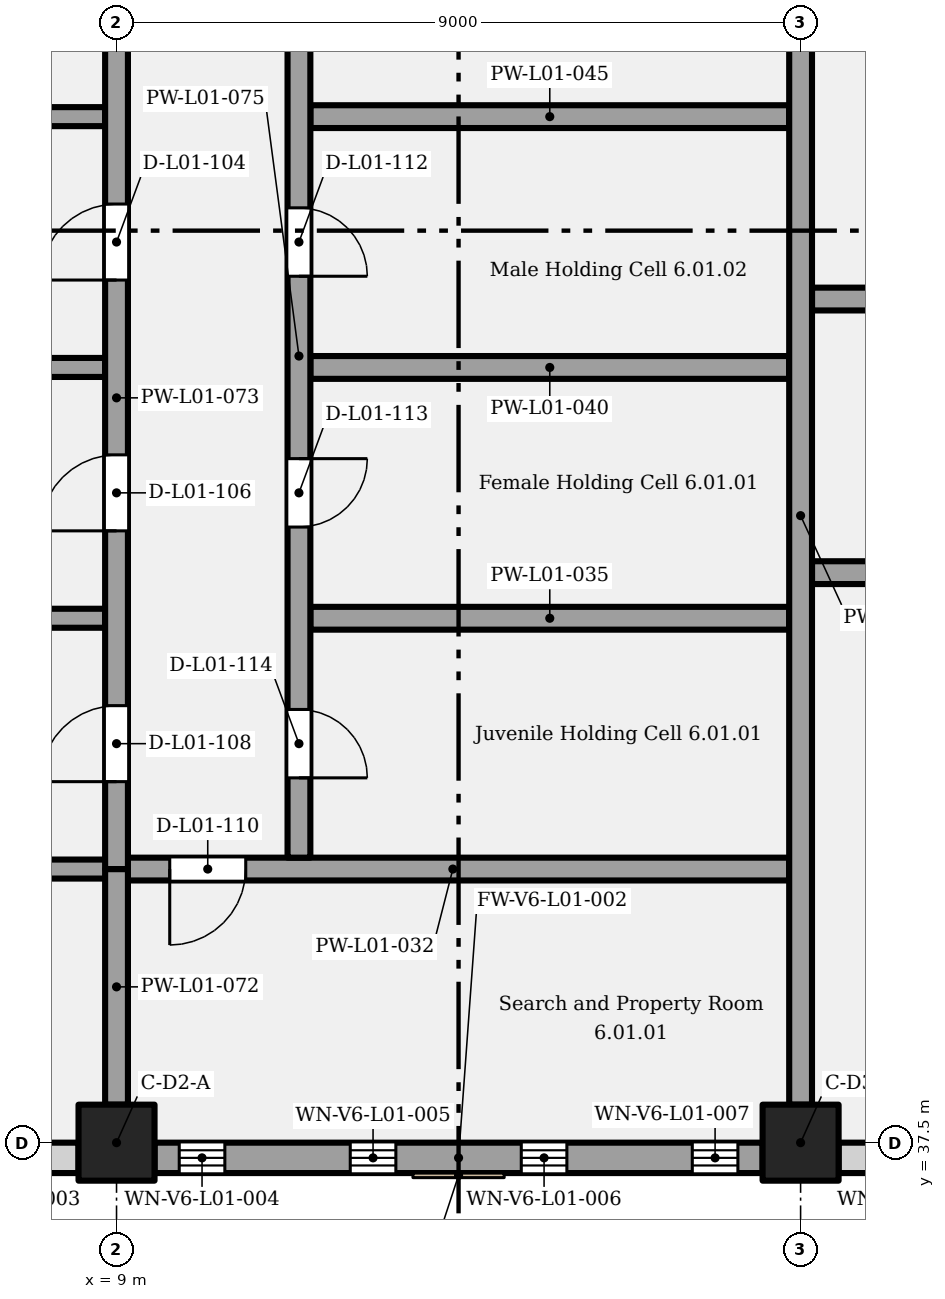
"""IFC4 building model, lengths in metres.
Left out: names, types, materials, properties, quantities, classifications, styles, units other than length and angle.
Written with IfcOpenShell. Run it as: python <this file> out.ifc"""

import sys

from ifc_helpers import new_model, si_unit, direction, frame, frame_2d, origin, origin_2d, place, context, subcontext, project, spatial, rectangle, extrude, element, fill, save


model = new_model("IFC4")
c1 = context("Model", 3, precision=1e-05, world=origin(), true_north=direction((0.0, 1.0)))
c2 = subcontext(c1, "Body", "Model", "MODEL_VIEW")
j1 = project(units=[si_unit("LENGTHUNIT", "METRE"), si_unit("PLANEANGLEUNIT", "RADIAN")], contexts=[c1])
p1 = place(None, origin())
s1 = spatial("IfcSite", under=j1, at=p1, CompositionType="ELEMENT")
p2 = place(p1, origin())
s2 = spatial("IfcBuilding", under=s1, at=p2, CompositionType="ELEMENT")
p3 = place(p2, frame((0.0, 0.0, 6.6)))
s3 = spatial("IfcBuildingStorey", under=s2, at=p3, CompositionType="ELEMENT", Elevation=6.6)
for number, where, z_axis, x_axis in (
    (1, (9.0, 37.5, 0.0), (0.0, 0.0, 1.0), (1.0, 0.0, 0.0)),
    (2, (18.0, 37.5, 0.0), (0.0, 0.0, 1.0), (1.0, 0.0, 0.0)),
):
    element("IfcColumn", number, at=place(p3, frame(where, z_axis=z_axis, x_axis=x_axis)), inside=s3, PredefinedType="COLUMN", context=c2, shape_type="SweptSolid", body=[
        extrude(rectangle(XDim=1.0, YDim=1.0, at=origin_2d()), origin(), (0.0, 0.0, 1.0), 5.4),
    ])
p4 = place(p3, frame((0.45, 37.3, 0.0), z_axis=(0.0, 0.0, 1.0), x_axis=(1.0, 0.0, 0.0)))
e3 = element("IfcWall", 3, at=p4, inside=s3, PredefinedType="SOLIDWALL", context=c2, shape_type="SweptSolid", body=[
    extrude(rectangle(XDim=8.05, YDim=0.4, at=frame_2d((4.025, 0.0))), origin(), (0.0, 0.0, 1.0), 5.1),
])
p5 = place(p4, frame((0.6, 0.0, 1.5)))
e4 = element("IfcOpeningElement", 4, at=p5, cuts=e3, PredefinedType="OPENING", context=c2, shape_type="SweptSolid", body=[
    extrude(rectangle(XDim=0.9, YDim=1.8, at=frame_2d((0.45, 0.9))), frame((0.0, 0.21, 0.0), z_axis=(0.0, -1.0, 0.0), x_axis=(1.0, 0.0, 0.0)), (0.0, 0.0, 1.0), 0.42),
])
p6 = place(p4, frame((3.6, 0.0, 1.5)))
e5 = element("IfcOpeningElement", 5, at=p6, cuts=e3, PredefinedType="OPENING", context=c2, shape_type="SweptSolid", body=[
    extrude(rectangle(XDim=0.9, YDim=1.8, at=frame_2d((0.45, 0.9))), frame((0.0, 0.21, 0.0), z_axis=(0.0, -1.0, 0.0), x_axis=(1.0, 0.0, 0.0)), (0.0, 0.0, 1.0), 0.42),
])
p7 = place(p4, frame((6.6, 0.0, 1.5)))
e6 = element("IfcOpeningElement", 6, at=p7, cuts=e3, PredefinedType="OPENING", context=c2, shape_type="SweptSolid", body=[
    extrude(rectangle(XDim=0.9, YDim=1.8, at=frame_2d((0.45, 0.9))), frame((0.0, 0.21, 0.0), z_axis=(0.0, -1.0, 0.0), x_axis=(1.0, 0.0, 0.0)), (0.0, 0.0, 1.0), 0.42),
])
p8 = place(p3, frame((9.5, 37.3, 0.0), z_axis=(0.0, 0.0, 1.0), x_axis=(1.0, 0.0, 0.0)))
e7 = element("IfcWall", 7, at=p8, inside=s3, PredefinedType="SOLIDWALL", context=c2, shape_type="SweptSolid", body=[
    extrude(rectangle(XDim=8.0, YDim=0.4, at=frame_2d((4.0, 0.0))), origin(), (0.0, 0.0, 1.0), 5.1),
])
p9 = place(p8, frame((0.325, 0.0, 1.5)))
e8 = element("IfcOpeningElement", 8, at=p9, cuts=e7, PredefinedType="OPENING", context=c2, shape_type="SweptSolid", body=[
    extrude(rectangle(XDim=0.6, YDim=3.0, at=frame_2d((0.3, 1.5))), frame((0.0, 0.21, 0.0), z_axis=(0.0, -1.0, 0.0), x_axis=(1.0, 0.0, 0.0)), (0.0, 0.0, 1.0), 0.42),
])
p10 = place(p8, frame((2.575, 0.0, 1.5)))
e9 = element("IfcOpeningElement", 9, at=p10, cuts=e7, PredefinedType="OPENING", context=c2, shape_type="SweptSolid", body=[
    extrude(rectangle(XDim=0.6, YDim=3.0, at=frame_2d((0.3, 1.5))), frame((0.0, 0.21, 0.0), z_axis=(0.0, -1.0, 0.0), x_axis=(1.0, 0.0, 0.0)), (0.0, 0.0, 1.0), 0.42),
])
p11 = place(p8, frame((4.825, 0.0, 1.5)))
e10 = element("IfcOpeningElement", 10, at=p11, cuts=e7, PredefinedType="OPENING", context=c2, shape_type="SweptSolid", body=[
    extrude(rectangle(XDim=0.6, YDim=3.0, at=frame_2d((0.3, 1.5))), frame((0.0, 0.21, 0.0), z_axis=(0.0, -1.0, 0.0), x_axis=(1.0, 0.0, 0.0)), (0.0, 0.0, 1.0), 0.42),
])
p12 = place(p8, frame((7.075, 0.0, 1.5)))
e11 = element("IfcOpeningElement", 11, at=p12, cuts=e7, PredefinedType="OPENING", context=c2, shape_type="SweptSolid", body=[
    extrude(rectangle(XDim=0.6, YDim=3.0, at=frame_2d((0.3, 1.5))), frame((0.0, 0.21, 0.0), z_axis=(0.0, -1.0, 0.0), x_axis=(1.0, 0.0, 0.0)), (0.0, 0.0, 1.0), 0.42),
])
p13 = place(p3, frame((18.5, 37.3, 0.0), z_axis=(0.0, 0.0, 1.0), x_axis=(1.0, 0.0, 0.0)))
e12 = element("IfcWall", 12, at=p13, inside=s3, PredefinedType="SOLIDWALL", context=c2, shape_type="SweptSolid", body=[
    extrude(rectangle(XDim=8.0, YDim=0.4, at=frame_2d((4.0, 0.0))), origin(), (0.0, 0.0, 1.0), 5.1),
])
p14 = place(p13, frame((0.55, 0.0, 1.5)))
e13 = element("IfcOpeningElement", 13, at=p14, cuts=e12, PredefinedType="OPENING", context=c2, shape_type="SweptSolid", body=[
    extrude(rectangle(XDim=0.9, YDim=1.8, at=frame_2d((0.45, 0.9))), frame((0.0, 0.21, 0.0), z_axis=(0.0, -1.0, 0.0), x_axis=(1.0, 0.0, 0.0)), (0.0, 0.0, 1.0), 0.42),
])
p15 = place(p13, frame((3.55, 0.0, 1.5)))
e14 = element("IfcOpeningElement", 14, at=p15, cuts=e12, PredefinedType="OPENING", context=c2, shape_type="SweptSolid", body=[
    extrude(rectangle(XDim=0.9, YDim=1.8, at=frame_2d((0.45, 0.9))), frame((0.0, 0.21, 0.0), z_axis=(0.0, -1.0, 0.0), x_axis=(1.0, 0.0, 0.0)), (0.0, 0.0, 1.0), 0.42),
])
p16 = place(p13, frame((6.55, 0.0, 1.5)))
e15 = element("IfcOpeningElement", 15, at=p16, cuts=e12, PredefinedType="OPENING", context=c2, shape_type="SweptSolid", body=[
    extrude(rectangle(XDim=0.9, YDim=1.8, at=frame_2d((0.45, 0.9))), frame((0.0, 0.21, 0.0), z_axis=(0.0, -1.0, 0.0), x_axis=(1.0, 0.0, 0.0)), (0.0, 0.0, 1.0), 0.42),
])
p17 = place(p3, frame((2.4, 41.1, 0.0), z_axis=(0.0, 0.0, 1.0), x_axis=(1.0, 0.0, 0.0)))
e16 = element("IfcWall", 16, at=p17, inside=s3, PredefinedType="PARTITIONING", context=c2, shape_type="SweptSolid", body=[
    extrude(rectangle(XDim=6.6, YDim=0.25, at=frame_2d((3.3, 0.0))), origin(), (0.0, 0.0, 1.0), 5.1),
])
p18 = place(p3, frame((9.0, 41.1, 0.0), z_axis=(0.0, 0.0, 1.0), x_axis=(1.0, 0.0, 0.0)))
e17 = element("IfcWall", 17, at=p18, inside=s3, PredefinedType="PARTITIONING", context=c2, shape_type="SweptSolid", body=[
    extrude(rectangle(XDim=8.85, YDim=0.3, at=frame_2d((4.425, 0.0))), origin(), (0.0, 0.0, 1.0), 5.1),
])
p19 = place(p18, frame((1.7, 0.0, 0.0), z_axis=(0.0, 0.0, 1.0), x_axis=(-1.0, 0.0, 0.0)))
e18 = element("IfcOpeningElement", 18, at=p19, cuts=e17, PredefinedType="OPENING", context=c2, shape_type="SweptSolid", body=[
    extrude(rectangle(XDim=1.0, YDim=2.1, at=frame_2d((0.5, 1.05))), frame((0.0, 0.16, 0.0), z_axis=(0.0, -1.0, 0.0), x_axis=(1.0, 0.0, 0.0)), (0.0, 0.0, 1.0), 0.32),
])
p20 = place(p3, frame((2.525, 44.4, 0.0), z_axis=(0.0, 0.0, 1.0), x_axis=(1.0, 0.0, 0.0)))
e19 = element("IfcWall", 19, at=p20, inside=s3, PredefinedType="PARTITIONING", context=c2, shape_type="SweptSolid", body=[
    extrude(rectangle(XDim=6.325, YDim=0.25, at=frame_2d((3.163, 0.0))), origin(), (0.0, 0.0, 1.0), 5.1),
])
p21 = place(p3, frame((11.55, 44.4, 0.0), z_axis=(0.0, 0.0, 1.0), x_axis=(1.0, 0.0, 0.0)))
e20 = element("IfcWall", 20, at=p21, inside=s3, PredefinedType="PARTITIONING", context=c2, shape_type="SweptSolid", body=[
    extrude(rectangle(XDim=6.3, YDim=0.3, at=frame_2d((3.15, 0.0))), origin(), (0.0, 0.0, 1.0), 5.1),
])
p22 = place(p3, frame((18.15, 45.0, 0.0), z_axis=(0.0, 0.0, 1.0), x_axis=(1.0, 0.0, 0.0)))
e21 = element("IfcWall", 21, at=p22, inside=s3, PredefinedType="PARTITIONING", context=c2, shape_type="SweptSolid", body=[
    extrude(rectangle(XDim=8.85, YDim=0.3, at=frame_2d((4.425, 0.0))), origin(), (0.0, 0.0, 1.0), 5.1),
])
p23 = place(p22, frame((3.35, 0.0, 0.0), z_axis=(0.0, 0.0, 1.0), x_axis=(-1.0, 0.0, 0.0)))
e22 = element("IfcOpeningElement", 22, at=p23, cuts=e21, PredefinedType="OPENING", context=c2, shape_type="SweptSolid", body=[
    extrude(rectangle(XDim=1.0, YDim=2.1, at=frame_2d((0.5, 1.05))), frame((0.0, 0.16, 0.0), z_axis=(0.0, -1.0, 0.0), x_axis=(1.0, 0.0, 0.0)), (0.0, 0.0, 1.0), 0.32),
])
p24 = place(p3, frame((2.525, 47.7, 0.0), z_axis=(0.0, 0.0, 1.0), x_axis=(1.0, 0.0, 0.0)))
e23 = element("IfcWall", 23, at=p24, inside=s3, PredefinedType="PARTITIONING", context=c2, shape_type="SweptSolid", body=[
    extrude(rectangle(XDim=6.325, YDim=0.25, at=frame_2d((3.163, 0.0))), origin(), (0.0, 0.0, 1.0), 5.1),
])
p25 = place(p3, frame((11.55, 47.7, 0.0), z_axis=(0.0, 0.0, 1.0), x_axis=(1.0, 0.0, 0.0)))
e24 = element("IfcWall", 24, at=p25, inside=s3, PredefinedType="PARTITIONING", context=c2, shape_type="SweptSolid", body=[
    extrude(rectangle(XDim=6.3, YDim=0.3, at=frame_2d((3.15, 0.0))), origin(), (0.0, 0.0, 1.0), 5.1),
])
p26 = place(p3, frame((18.15, 48.6, 0.0), z_axis=(0.0, 0.0, 1.0), x_axis=(1.0, 0.0, 0.0)))
e25 = element("IfcWall", 25, at=p26, inside=s3, PredefinedType="PARTITIONING", context=c2, shape_type="SweptSolid", body=[
    extrude(rectangle(XDim=6.3, YDim=0.3, at=frame_2d((3.15, 0.0))), origin(), (0.0, 0.0, 1.0), 5.1),
])
p27 = place(p26, frame((3.35, 0.0, 0.0), z_axis=(0.0, 0.0, 1.0), x_axis=(-1.0, 0.0, 0.0)))
e26 = element("IfcOpeningElement", 26, at=p27, cuts=e25, PredefinedType="OPENING", context=c2, shape_type="SweptSolid", body=[
    extrude(rectangle(XDim=1.0, YDim=2.1, at=frame_2d((0.5, 1.05))), frame((0.0, 0.16, 0.0), z_axis=(0.0, -1.0, 0.0), x_axis=(1.0, 0.0, 0.0)), (0.0, 0.0, 1.0), 0.32),
])
p28 = place(p3, frame((2.525, 51.0, 0.0), z_axis=(0.0, 0.0, 1.0), x_axis=(1.0, 0.0, 0.0)))
e27 = element("IfcWall", 27, at=p28, inside=s3, PredefinedType="PARTITIONING", context=c2, shape_type="SweptSolid", body=[
    extrude(rectangle(XDim=6.325, YDim=0.25, at=frame_2d((3.163, 0.0))), origin(), (0.0, 0.0, 1.0), 5.1),
])
p29 = place(p3, frame((11.55, 51.0, 0.0), z_axis=(0.0, 0.0, 1.0), x_axis=(1.0, 0.0, 0.0)))
e28 = element("IfcWall", 28, at=p29, inside=s3, PredefinedType="PARTITIONING", context=c2, shape_type="SweptSolid", body=[
    extrude(rectangle(XDim=6.3, YDim=0.3, at=frame_2d((3.15, 0.0))), origin(), (0.0, 0.0, 1.0), 5.1),
])
p30 = place(p3, frame((9.0, 38.0, 0.0), z_axis=(0.0, 0.0, 1.0), x_axis=(0.0, 1.0, 0.0)))
e29 = element("IfcWall", 29, at=p30, inside=s3, PredefinedType="PARTITIONING", context=c2, shape_type="SweptSolid", body=[
    extrude(rectangle(XDim=3.1, YDim=0.3, at=frame_2d((1.55, 0.0))), origin(), (0.0, 0.0, 1.0), 4.15),
])
p31 = place(p3, frame((9.0, 41.1, 0.0), z_axis=(0.0, 0.0, 1.0), x_axis=(0.0, 1.0, 0.0)))
e30 = element("IfcWall", 30, at=p31, inside=s3, PredefinedType="PARTITIONING", context=c2, shape_type="SweptSolid", body=[
    extrude(rectangle(XDim=12.4, YDim=0.3, at=frame_2d((6.2, 0.0))), origin(), (0.0, 0.0, 1.0), 4.15),
])
p32 = place(p31, frame((11.2, 0.0, 0.0)))
e31 = element("IfcOpeningElement", 31, at=p32, cuts=e30, PredefinedType="OPENING", context=c2, shape_type="SweptSolid", body=[
    extrude(rectangle(XDim=1.0, YDim=2.1, at=frame_2d((0.5, 1.05))), frame((0.0, 0.16, 0.0), z_axis=(0.0, -1.0, 0.0), x_axis=(1.0, 0.0, 0.0)), (0.0, 0.0, 1.0), 0.32),
])
p33 = place(p31, frame((7.75, 0.0, 0.0)))
e32 = element("IfcOpeningElement", 32, at=p33, cuts=e30, PredefinedType="OPENING", context=c2, shape_type="SweptSolid", body=[
    extrude(rectangle(XDim=1.0, YDim=2.1, at=frame_2d((0.5, 1.05))), frame((0.0, 0.16, 0.0), z_axis=(0.0, -1.0, 0.0), x_axis=(1.0, 0.0, 0.0)), (0.0, 0.0, 1.0), 0.32),
])
p34 = place(p31, frame((4.45, 0.0, 0.0)))
e33 = element("IfcOpeningElement", 33, at=p34, cuts=e30, PredefinedType="OPENING", context=c2, shape_type="SweptSolid", body=[
    extrude(rectangle(XDim=1.0, YDim=2.1, at=frame_2d((0.5, 1.05))), frame((0.0, 0.16, 0.0), z_axis=(0.0, -1.0, 0.0), x_axis=(1.0, 0.0, 0.0)), (0.0, 0.0, 1.0), 0.32),
])
p35 = place(p31, frame((1.15, 0.0, 0.0)))
e34 = element("IfcOpeningElement", 34, at=p35, cuts=e30, PredefinedType="OPENING", context=c2, shape_type="SweptSolid", body=[
    extrude(rectangle(XDim=1.0, YDim=2.1, at=frame_2d((0.5, 1.05))), frame((0.0, 0.16, 0.0), z_axis=(0.0, -1.0, 0.0), x_axis=(1.0, 0.0, 0.0)), (0.0, 0.0, 1.0), 0.32),
])
p36 = place(p3, frame((11.4, 41.25, 0.0), z_axis=(0.0, 0.0, 1.0), x_axis=(0.0, 1.0, 0.0)))
e35 = element("IfcWall", 35, at=p36, inside=s3, PredefinedType="PARTITIONING", context=c2, shape_type="SweptSolid", body=[
    extrude(rectangle(XDim=13.2, YDim=0.3, at=frame_2d((6.6, 0.0))), origin(), (0.0, 0.0, 1.0), 5.1),
])
p37 = place(p36, frame((12.0, 0.0, 0.0), z_axis=(0.0, 0.0, 1.0), x_axis=(-1.0, 0.0, 0.0)))
e36 = element("IfcOpeningElement", 36, at=p37, cuts=e35, PredefinedType="OPENING", context=c2, shape_type="SweptSolid", body=[
    extrude(rectangle(XDim=0.9, YDim=2.0, at=frame_2d((0.45, 1.0))), frame((0.0, 0.16, 0.0), z_axis=(0.0, -1.0, 0.0), x_axis=(1.0, 0.0, 0.0)), (0.0, 0.0, 1.0), 0.32),
])
p38 = place(p36, frame((8.55, 0.0, 0.0), z_axis=(0.0, 0.0, 1.0), x_axis=(-1.0, 0.0, 0.0)))
e37 = element("IfcOpeningElement", 37, at=p38, cuts=e35, PredefinedType="OPENING", context=c2, shape_type="SweptSolid", body=[
    extrude(rectangle(XDim=0.9, YDim=2.0, at=frame_2d((0.45, 1.0))), frame((0.0, 0.16, 0.0), z_axis=(0.0, -1.0, 0.0), x_axis=(1.0, 0.0, 0.0)), (0.0, 0.0, 1.0), 0.32),
])
p39 = place(p36, frame((5.25, 0.0, 0.0), z_axis=(0.0, 0.0, 1.0), x_axis=(-1.0, 0.0, 0.0)))
e38 = element("IfcOpeningElement", 38, at=p39, cuts=e35, PredefinedType="OPENING", context=c2, shape_type="SweptSolid", body=[
    extrude(rectangle(XDim=0.9, YDim=2.0, at=frame_2d((0.45, 1.0))), frame((0.0, 0.16, 0.0), z_axis=(0.0, -1.0, 0.0), x_axis=(1.0, 0.0, 0.0)), (0.0, 0.0, 1.0), 0.32),
])
p40 = place(p36, frame((1.95, 0.0, 0.0), z_axis=(0.0, 0.0, 1.0), x_axis=(-1.0, 0.0, 0.0)))
e39 = element("IfcOpeningElement", 39, at=p40, cuts=e35, PredefinedType="OPENING", context=c2, shape_type="SweptSolid", body=[
    extrude(rectangle(XDim=0.9, YDim=2.0, at=frame_2d((0.45, 1.0))), frame((0.0, 0.16, 0.0), z_axis=(0.0, -1.0, 0.0), x_axis=(1.0, 0.0, 0.0)), (0.0, 0.0, 1.0), 0.32),
])
p41 = place(p3, frame((18.0, 38.0, 0.0), z_axis=(0.0, 0.0, 1.0), x_axis=(0.0, 1.0, 0.0)))
e40 = element("IfcWall", 40, at=p41, inside=s3, PredefinedType="PARTITIONING", context=c2, shape_type="SweptSolid", body=[
    extrude(rectangle(XDim=15.5, YDim=0.3, at=frame_2d((7.75, 0.0))), origin(), (0.0, 0.0, 1.0), 4.15),
])
p42 = place(p9, origin())
e41 = element("IfcWindow", 41, at=p42, inside=s3, PartitioningType="SINGLE_PANEL", PredefinedType="WINDOW", context=c2, shape_type="SweptSolid", body=[
    extrude(rectangle(XDim=0.6, YDim=3.0, at=frame_2d((0.3, 1.5))), frame((0.0, 0.03, 0.0), z_axis=(0.0, -1.0, 0.0), x_axis=(1.0, 0.0, 0.0)), (0.0, 0.0, 1.0), 0.06),
])
fill(e8, e41)
p43 = place(p10, origin())
e42 = element("IfcWindow", 42, at=p43, inside=s3, PartitioningType="SINGLE_PANEL", PredefinedType="WINDOW", context=c2, shape_type="SweptSolid", body=[
    extrude(rectangle(XDim=0.6, YDim=3.0, at=frame_2d((0.3, 1.5))), frame((0.0, 0.03, 0.0), z_axis=(0.0, -1.0, 0.0), x_axis=(1.0, 0.0, 0.0)), (0.0, 0.0, 1.0), 0.06),
])
fill(e9, e42)
p44 = place(p11, origin())
e43 = element("IfcWindow", 43, at=p44, inside=s3, PartitioningType="SINGLE_PANEL", PredefinedType="WINDOW", context=c2, shape_type="SweptSolid", body=[
    extrude(rectangle(XDim=0.6, YDim=3.0, at=frame_2d((0.3, 1.5))), frame((0.0, 0.03, 0.0), z_axis=(0.0, -1.0, 0.0), x_axis=(1.0, 0.0, 0.0)), (0.0, 0.0, 1.0), 0.06),
])
fill(e10, e43)
p45 = place(p12, origin())
e44 = element("IfcWindow", 44, at=p45, inside=s3, PartitioningType="SINGLE_PANEL", PredefinedType="WINDOW", context=c2, shape_type="SweptSolid", body=[
    extrude(rectangle(XDim=0.6, YDim=3.0, at=frame_2d((0.3, 1.5))), frame((0.0, 0.03, 0.0), z_axis=(0.0, -1.0, 0.0), x_axis=(1.0, 0.0, 0.0)), (0.0, 0.0, 1.0), 0.06),
])
fill(e11, e44)
p46 = place(p33, origin())
e45 = element("IfcDoor", 45, at=p46, inside=s3, OperationType="SINGLE_SWING_LEFT", PredefinedType="DOOR", context=c2, shape_type="SweptSolid", body=[
    extrude(rectangle(XDim=1.0, YDim=2.1, at=frame_2d((0.5, 1.05))), frame((0.0, 0.025, 0.0), z_axis=(0.0, -1.0, 0.0), x_axis=(1.0, 0.0, 0.0)), (0.0, 0.0, 1.0), 0.05),
])
fill(e32, e45)
p47 = place(p34, origin())
e46 = element("IfcDoor", 46, at=p47, inside=s3, OperationType="SINGLE_SWING_LEFT", PredefinedType="DOOR", context=c2, shape_type="SweptSolid", body=[
    extrude(rectangle(XDim=1.0, YDim=2.1, at=frame_2d((0.5, 1.05))), frame((0.0, 0.025, 0.0), z_axis=(0.0, -1.0, 0.0), x_axis=(1.0, 0.0, 0.0)), (0.0, 0.0, 1.0), 0.05),
])
fill(e33, e46)
p48 = place(p35, origin())
e47 = element("IfcDoor", 47, at=p48, inside=s3, OperationType="SINGLE_SWING_LEFT", PredefinedType="DOOR", context=c2, shape_type="SweptSolid", body=[
    extrude(rectangle(XDim=1.0, YDim=2.1, at=frame_2d((0.5, 1.05))), frame((0.0, 0.025, 0.0), z_axis=(0.0, -1.0, 0.0), x_axis=(1.0, 0.0, 0.0)), (0.0, 0.0, 1.0), 0.05),
])
fill(e34, e47)
p49 = place(p19, origin())
e48 = element("IfcDoor", 48, at=p49, inside=s3, OperationType="SINGLE_SWING_RIGHT", PredefinedType="DOOR", context=c2, shape_type="SweptSolid", body=[
    extrude(rectangle(XDim=1.0, YDim=2.1, at=frame_2d((0.5, 1.05))), frame((0.0, 0.025, 0.0), z_axis=(0.0, -1.0, 0.0), x_axis=(1.0, 0.0, 0.0)), (0.0, 0.0, 1.0), 0.05),
])
fill(e18, e48)
p50 = place(p38, origin())
e49 = element("IfcDoor", 49, at=p50, inside=s3, OperationType="SINGLE_SWING_RIGHT", PredefinedType="DOOR", context=c2, shape_type="SweptSolid", body=[
    extrude(rectangle(XDim=0.9, YDim=2.0, at=frame_2d((0.45, 1.0))), frame((0.0, 0.025, 0.0), z_axis=(0.0, -1.0, 0.0), x_axis=(1.0, 0.0, 0.0)), (0.0, 0.0, 1.0), 0.05),
])
fill(e37, e49)
p51 = place(p39, origin())
e50 = element("IfcDoor", 50, at=p51, inside=s3, OperationType="SINGLE_SWING_LEFT", PredefinedType="DOOR", context=c2, shape_type="SweptSolid", body=[
    extrude(rectangle(XDim=0.9, YDim=2.0, at=frame_2d((0.45, 1.0))), frame((0.0, 0.025, 0.0), z_axis=(0.0, -1.0, 0.0), x_axis=(1.0, 0.0, 0.0)), (0.0, 0.0, 1.0), 0.05),
])
fill(e38, e50)
p52 = place(p40, origin())
e51 = element("IfcDoor", 51, at=p52, inside=s3, OperationType="SINGLE_SWING_RIGHT", PredefinedType="DOOR", context=c2, shape_type="SweptSolid", body=[
    extrude(rectangle(XDim=0.9, YDim=2.0, at=frame_2d((0.45, 1.0))), frame((0.0, 0.025, 0.0), z_axis=(0.0, -1.0, 0.0), x_axis=(1.0, 0.0, 0.0)), (0.0, 0.0, 1.0), 0.05),
])
fill(e39, e51)
save(model, sys.argv[1])
